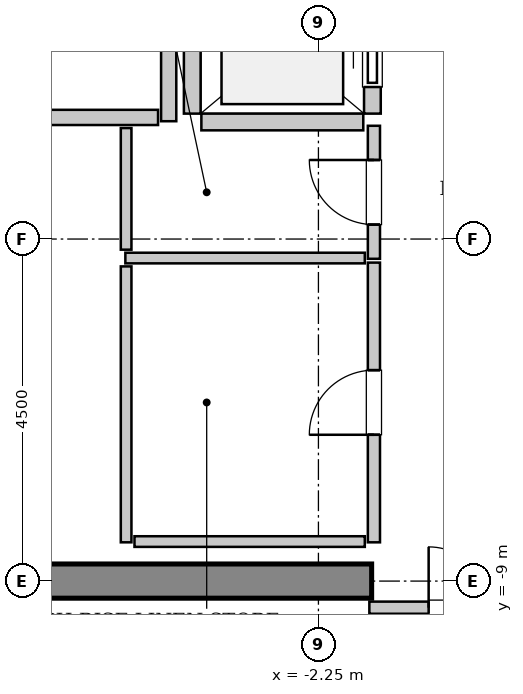
"""IFC4 building model, lengths in metres.
Left out: names, types, materials, properties, quantities, classifications, styles, units other than length and angle.
Written with IfcOpenShell. Run it as: python <this file> out.ifc"""

import sys

from ifc_helpers import new_model, si_unit, direction, frame, frame_2d, origin, place, context, subcontext, project, spatial, rectangle, extrude, source, transform, mapped, element, fill, save


model = new_model("IFC4")
c1 = context("Model", 3, precision=1e-05, world=origin(), true_north=direction((0.0, 1.0)))
c2 = subcontext(c1, "Body", "Model", "MODEL_VIEW")
j1 = project(units=[si_unit("LENGTHUNIT", "METRE"), si_unit("PLANEANGLEUNIT", "RADIAN")], contexts=[c1])
p1 = place(None, origin())
s1 = spatial("IfcSite", under=j1, at=p1, CompositionType="ELEMENT")
p2 = place(p1, origin())
s2 = spatial("IfcBuilding", under=s1, at=p2, CompositionType="ELEMENT")
p3 = place(p2, frame((0.0, 0.0, 314.0)))
s3 = spatial("IfcBuildingStorey", under=s2, at=p3, CompositionType="ELEMENT", Elevation=314.0)
m1 = source(origin(), c2, "Body", "SweptSolid", [
    extrude(rectangle(XDim=9.925, YDim=0.45, at=frame_2d((4.962, 0.0))), origin(), (0.0, 0.0, 1.0), 3.8),
])
p4 = place(p3, frame((-11.475, -9.0, 0.0), z_axis=(0.0, 0.0, 1.0), x_axis=(1.0, 0.0, 0.0)))
e1 = element("IfcWall", 1, at=p4, inside=s3, PredefinedType="SHEAR", context=c2, shape_type="MappedRepresentation", body=[
    mapped(m1, transform((0.0, 0.0, 0.0), x_axis=(1.0, 0.0, 0.0), y_axis=(0.0, 1.0, 0.0), z_axis=(0.0, 0.0, 1.0), scale=1.0)),
])
m2 = source(origin(), c2, "Body", "SweptSolid", [
    extrude(rectangle(XDim=5.7, YDim=0.22, at=frame_2d((2.85, 0.0))), origin(), (0.0, 0.0, 1.0), 3.485),
])
p5 = place(p3, frame((-1.54, -2.85, 0.0), z_axis=(0.0, 0.0, 1.0), x_axis=(0.0, 1.0, 0.0)))
e2 = element("IfcWall", 2, at=p5, inside=s3, PredefinedType="SOLIDWALL", context=c2, shape_type="MappedRepresentation", body=[
    mapped(m2, transform((0.0, 0.0, 0.0), x_axis=(1.0, 0.0, 0.0), y_axis=(0.0, 1.0, 0.0), z_axis=(0.0, 0.0, 1.0), scale=1.0)),
])
p6 = place(p5, frame((0.35, 0.0, 0.0)))
e3 = element("IfcOpeningElement", 3, at=p6, cuts=e2, PredefinedType="OPENING", context=c2, shape_type="SweptSolid", body=[
    extrude(rectangle(XDim=1.1, YDim=2.2, at=frame_2d((0.55, 1.1))), frame((0.0, 0.12, 0.0), z_axis=(0.0, -1.0, 0.0), x_axis=(1.0, 0.0, 0.0)), (0.0, 0.0, 1.0), 0.24),
])
p7 = place(p5, frame((2.3, 0.0, 0.0)))
e4 = element("IfcOpeningElement", 4, at=p7, cuts=e2, PredefinedType="OPENING", context=c2, shape_type="SweptSolid", body=[
    extrude(rectangle(XDim=1.1, YDim=2.2, at=frame_2d((0.55, 1.1))), frame((0.0, 0.12, 0.0), z_axis=(0.0, -1.0, 0.0), x_axis=(1.0, 0.0, 0.0)), (0.0, 0.0, 1.0), 0.24),
])
p8 = place(p5, frame((4.25, 0.0, 0.0)))
e5 = element("IfcOpeningElement", 5, at=p8, cuts=e2, PredefinedType="OPENING", context=c2, shape_type="SweptSolid", body=[
    extrude(rectangle(XDim=1.1, YDim=2.2, at=frame_2d((0.55, 1.1))), frame((0.0, 0.12, 0.0), z_axis=(0.0, -1.0, 0.0), x_axis=(1.0, 0.0, 0.0)), (0.0, 0.0, 1.0), 0.24),
])
p9 = place(p3, frame((-3.91, 2.85, 0.0), z_axis=(0.0, 0.0, 1.0), x_axis=(0.0, -1.0, 0.0)))
e6 = element("IfcWall", 6, at=p9, inside=s3, PredefinedType="SOLIDWALL", context=c2, shape_type="MappedRepresentation", body=[
    mapped(m2, transform((0.0, 0.0, 0.0), x_axis=(1.0, 0.0, 0.0), y_axis=(0.0, 1.0, 0.0), z_axis=(0.0, 0.0, 1.0), scale=1.0)),
])
m3 = source(origin(), c2, "Body", "SweptSolid", [
    extrude(rectangle(XDim=2.13, YDim=0.22, at=frame_2d((1.065, 0.0))), origin(), (0.0, 0.0, 1.0), 3.485),
])
p10 = place(p3, frame((-3.79, -2.96, 0.0), z_axis=(0.0, 0.0, 1.0), x_axis=(1.0, 0.0, 0.0)))
e7 = element("IfcWall", 7, at=p10, inside=s3, PredefinedType="SOLIDWALL", context=c2, shape_type="MappedRepresentation", body=[
    mapped(m3, transform((0.0, 0.0, 0.0), x_axis=(1.0, 0.0, 0.0), y_axis=(0.0, 1.0, 0.0), z_axis=(0.0, 0.0, 1.0), scale=1.0)),
])
m4 = source(origin(), c2, "Body", "SweptSolid", [
    extrude(rectangle(XDim=5.9, YDim=0.2, at=frame_2d((2.95, 0.0))), origin(), (0.0, 0.0, 1.0), 3.485),
])
p11 = place(p3, frame((-4.22, -2.95, 0.0), z_axis=(0.0, 0.0, 1.0), x_axis=(0.0, 1.0, 0.0)))
e8 = element("IfcWall", 8, at=p11, inside=s3, PredefinedType="PARTITIONING", context=c2, shape_type="MappedRepresentation", body=[
    mapped(m4, transform((0.0, 0.0, 0.0), x_axis=(1.0, 0.0, 0.0), y_axis=(0.0, 1.0, 0.0), z_axis=(0.0, 0.0, 1.0), scale=1.0)),
])
m5 = source(origin(), c2, "Body", "SweptSolid", [
    extrude(rectangle(XDim=2.9, YDim=0.2, at=frame_2d((1.45, 0.0))), origin(), (0.0, 0.0, 1.0), 3.485),
])
p12 = place(p3, frame((-7.26, -2.9, 0.0), z_axis=(0.0, 0.0, 1.0), x_axis=(1.0, 0.0, 0.0)))
e9 = element("IfcWall", 9, at=p12, inside=s3, PredefinedType="PARTITIONING", context=c2, shape_type="MappedRepresentation", body=[
    mapped(m5, transform((0.0, 0.0, 0.0), x_axis=(1.0, 0.0, 0.0), y_axis=(0.0, 1.0, 0.0), z_axis=(0.0, 0.0, 1.0), scale=1.0)),
])
m6 = source(origin(), c2, "Body", "SweptSolid", [
    extrude(rectangle(XDim=3.16, YDim=0.16, at=frame_2d((1.58, 0.0))), origin(), (0.0, 0.0, 1.0), 2.575),
])
p13 = place(p3, frame((-1.58, -9.35, 0.0), z_axis=(0.0, 0.0, 1.0), x_axis=(1.0, 0.0, 0.0)))
e10 = element("IfcWall", 10, at=p13, inside=s3, PredefinedType="PARTITIONING", context=c2, shape_type="MappedRepresentation", body=[
    mapped(m6, transform((0.0, 0.0, 0.0), x_axis=(1.0, 0.0, 0.0), y_axis=(0.0, 1.0, 0.0), z_axis=(0.0, 0.0, 1.0), scale=1.0)),
])
p14 = place(p13, frame((0.78, 0.0, 0.0)))
e11 = element("IfcOpeningElement", 11, at=p14, cuts=e10, PredefinedType="OPENING", context=c2, shape_type="SweptSolid", body=[
    extrude(rectangle(XDim=1.6, YDim=2.3, at=frame_2d((0.8, 1.15))), frame((0.0, 0.09, 0.0), z_axis=(0.0, -1.0, 0.0), x_axis=(1.0, 0.0, 0.0)), (0.0, 0.0, 1.0), 0.18),
])
m7 = source(origin(), c2, "Body", "SweptSolid", [
    extrude(rectangle(XDim=1.75, YDim=0.16, at=frame_2d((0.875, 0.0))), origin(), (0.0, 0.0, 1.0), 3.485),
])
p15 = place(p3, frame((-1.52, -4.76, 0.0), z_axis=(0.0, 0.0, 1.0), x_axis=(0.0, 1.0, 0.0)))
e12 = element("IfcWall", 12, at=p15, inside=s3, PredefinedType="PARTITIONING", context=c2, shape_type="MappedRepresentation", body=[
    mapped(m7, transform((0.0, 0.0, 0.0), x_axis=(1.0, 0.0, 0.0), y_axis=(0.0, 1.0, 0.0), z_axis=(0.0, 0.0, 1.0), scale=1.0)),
])
p16 = place(p15, frame((0.45, 0.0, 0.0)))
e13 = element("IfcOpeningElement", 13, at=p16, cuts=e12, PredefinedType="OPENING", context=c2, shape_type="SweptSolid", body=[
    extrude(rectangle(XDim=0.85, YDim=2.1, at=frame_2d((0.425, 1.05))), frame((0.0, 0.09, 0.0), z_axis=(0.0, -1.0, 0.0), x_axis=(1.0, 0.0, 0.0)), (0.0, 0.0, 1.0), 0.18),
])
m8 = source(origin(), c2, "Body", "SweptSolid", [
    extrude(rectangle(XDim=3.15, YDim=0.14, at=frame_2d((1.575, 0.0))), origin(), (0.0, 0.0, 1.0), 3.485),
])
p17 = place(p3, frame((-4.79, -4.75, 0.0), z_axis=(0.0, 0.0, 1.0), x_axis=(1.0, 0.0, 0.0)))
e14 = element("IfcWall", 14, at=p17, inside=s3, PredefinedType="PARTITIONING", context=c2, shape_type="MappedRepresentation", body=[
    mapped(m8, transform((0.0, 0.0, 0.0), x_axis=(1.0, 0.0, 0.0), y_axis=(0.0, 1.0, 0.0), z_axis=(0.0, 0.0, 1.0), scale=1.0)),
])
m9 = source(origin(), c2, "Body", "SweptSolid", [
    extrude(rectangle(XDim=1.6, YDim=0.14, at=frame_2d((0.8, 0.0))), origin(), (0.0, 0.0, 1.0), 3.485),
])
p18 = place(p3, frame((-4.78, -4.64, 0.0), z_axis=(0.0, 0.0, 1.0), x_axis=(0.0, 1.0, 0.0)))
e15 = element("IfcWall", 15, at=p18, inside=s3, PredefinedType="PARTITIONING", context=c2, shape_type="MappedRepresentation", body=[
    mapped(m9, transform((0.0, 0.0, 0.0), x_axis=(1.0, 0.0, 0.0), y_axis=(0.0, 1.0, 0.0), z_axis=(0.0, 0.0, 1.0), scale=1.0)),
])
m10 = source(origin(), c2, "Body", "SweptSolid", [
    extrude(rectangle(XDim=3.68, YDim=0.16, at=frame_2d((1.84, 0.0))), origin(), (0.0, 0.0, 1.0), 3.485),
])
p19 = place(p3, frame((-1.52, -8.49, 0.0), z_axis=(0.0, 0.0, 1.0), x_axis=(0.0, 1.0, 0.0)))
e16 = element("IfcWall", 16, at=p19, inside=s3, PredefinedType="PARTITIONING", context=c2, shape_type="MappedRepresentation", body=[
    mapped(m10, transform((0.0, 0.0, 0.0), x_axis=(1.0, 0.0, 0.0), y_axis=(0.0, 1.0, 0.0), z_axis=(0.0, 0.0, 1.0), scale=1.0)),
])
p20 = place(p19, frame((1.415, 0.0, 0.0)))
e17 = element("IfcOpeningElement", 17, at=p20, cuts=e16, PredefinedType="OPENING", context=c2, shape_type="SweptSolid", body=[
    extrude(rectangle(XDim=0.85, YDim=2.1, at=frame_2d((0.425, 1.05))), frame((0.0, 0.09, 0.0), z_axis=(0.0, -1.0, 0.0), x_axis=(1.0, 0.0, 0.0)), (0.0, 0.0, 1.0), 0.18),
])
m11 = source(origin(), c2, "Body", "SweptSolid", [
    extrude(rectangle(XDim=3.63, YDim=0.14, at=frame_2d((1.815, 0.0))), origin(), (0.0, 0.0, 1.0), 3.485),
])
p21 = place(p3, frame((-4.78, -8.49, 0.0), z_axis=(0.0, 0.0, 1.0), x_axis=(0.0, 1.0, 0.0)))
e18 = element("IfcWall", 18, at=p21, inside=s3, PredefinedType="PARTITIONING", context=c2, shape_type="MappedRepresentation", body=[
    mapped(m11, transform((0.0, 0.0, 0.0), x_axis=(1.0, 0.0, 0.0), y_axis=(0.0, 1.0, 0.0), z_axis=(0.0, 0.0, 1.0), scale=1.0)),
])
m12 = source(origin(), c2, "Body", "SweptSolid", [
    extrude(rectangle(XDim=3.03, YDim=0.14, at=frame_2d((1.515, 0.0))), origin(), (0.0, 0.0, 1.0), 3.485),
])
p22 = place(p3, frame((-4.67, -8.48, 0.0), z_axis=(0.0, 0.0, 1.0), x_axis=(1.0, 0.0, 0.0)))
e19 = element("IfcWall", 19, at=p22, inside=s3, PredefinedType="PARTITIONING", context=c2, shape_type="MappedRepresentation", body=[
    mapped(m12, transform((0.0, 0.0, 0.0), x_axis=(1.0, 0.0, 0.0), y_axis=(0.0, 1.0, 0.0), z_axis=(0.0, 0.0, 1.0), scale=1.0)),
])
m13 = source(origin(), c2, "Body", "SweptSolid", [
    extrude(rectangle(XDim=1.1, YDim=2.2, at=frame_2d((0.55, 1.1))), frame((0.0, 0.025, 0.0), z_axis=(0.0, -1.0, 0.0), x_axis=(1.0, 0.0, 0.0)), (0.0, 0.0, 1.0), 0.05),
])
p23 = place(p6, origin())
e20 = element("IfcDoor", 20, at=p23, inside=s3, OperationType="DOUBLE_DOOR_SLIDING", PredefinedType="DOOR", context=c2, shape_type="MappedRepresentation", body=[
    mapped(m13, transform((0.0, 0.0, 0.0), x_axis=(1.0, 0.0, 0.0), y_axis=(0.0, 1.0, 0.0), z_axis=(0.0, 0.0, 1.0), scale=1.0)),
])
fill(e3, e20)
m14 = source(origin(), c2, "Body", "SweptSolid", [
    extrude(rectangle(XDim=1.6, YDim=2.3, at=frame_2d((0.8, 1.15))), frame((0.0, 0.025, 0.0), z_axis=(0.0, -1.0, 0.0), x_axis=(1.0, 0.0, 0.0)), (0.0, 0.0, 1.0), 0.05),
])
p24 = place(p14, origin())
e21 = element("IfcDoor", 21, at=p24, inside=s3, OperationType="DOUBLE_DOOR_SINGLE_SWING", PredefinedType="DOOR", context=c2, shape_type="MappedRepresentation", body=[
    mapped(m14, transform((0.0, 0.0, 0.0), x_axis=(1.0, 0.0, 0.0), y_axis=(0.0, 1.0, 0.0), z_axis=(0.0, 0.0, 1.0), scale=1.0)),
])
fill(e11, e21)
m15 = source(origin(), c2, "Body", "SweptSolid", [
    extrude(rectangle(XDim=0.85, YDim=2.1, at=frame_2d((0.425, 1.05))), frame((0.0, 0.025, 0.0), z_axis=(0.0, -1.0, 0.0), x_axis=(1.0, 0.0, 0.0)), (0.0, 0.0, 1.0), 0.05),
])
p25 = place(p16, origin())
e22 = element("IfcDoor", 22, at=p25, inside=s3, OperationType="SINGLE_SWING_RIGHT", PredefinedType="DOOR", context=c2, shape_type="MappedRepresentation", body=[
    mapped(m15, transform((0.0, 0.0, 0.0), x_axis=(1.0, 0.0, 0.0), y_axis=(0.0, 1.0, 0.0), z_axis=(0.0, 0.0, 1.0), scale=1.0)),
])
fill(e13, e22)
p26 = place(p20, origin())
e23 = element("IfcDoor", 23, at=p26, inside=s3, OperationType="SINGLE_SWING_LEFT", PredefinedType="DOOR", context=c2, shape_type="MappedRepresentation", body=[
    mapped(m15, transform((0.0, 0.0, 0.0), x_axis=(1.0, 0.0, 0.0), y_axis=(0.0, 1.0, 0.0), z_axis=(0.0, 0.0, 1.0), scale=1.0)),
])
fill(e17, e23)
save(model, sys.argv[1])
